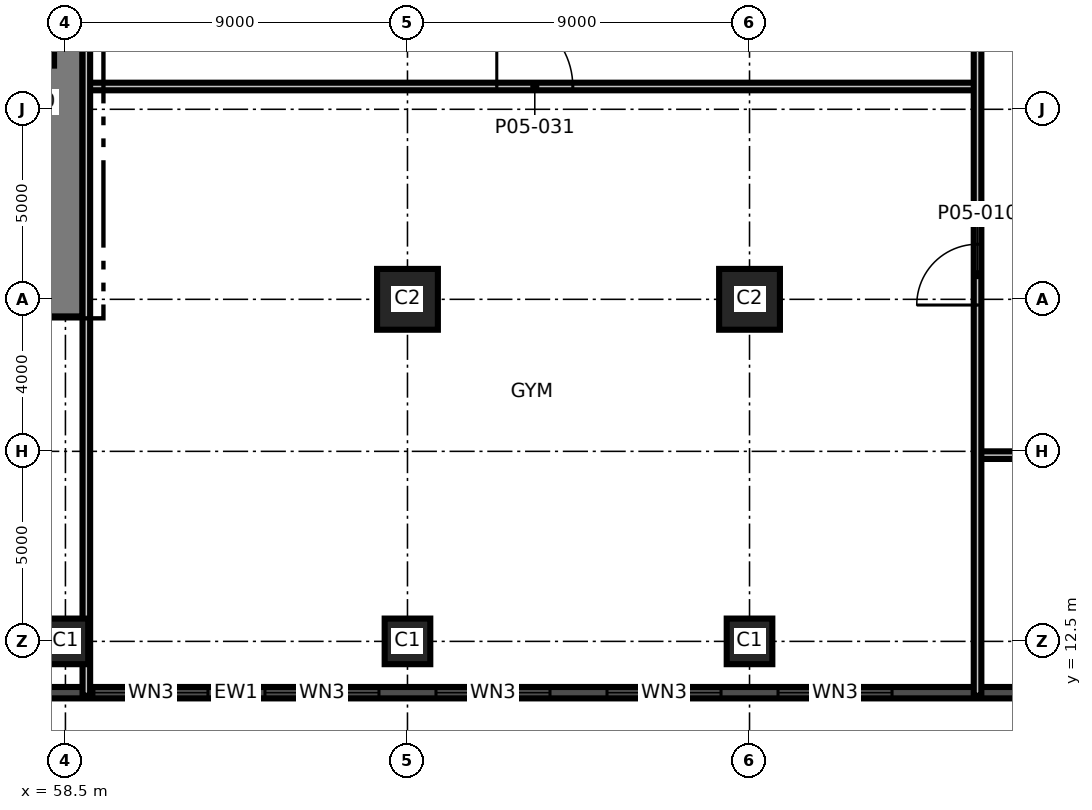
"""IFC4 building model, lengths in metres.
Left out: names, types, materials, properties, quantities, classifications, styles, units other than length and angle.
Written with IfcOpenShell. Run it as: python <this file> out.ifc"""

import sys

from ifc_helpers import new_model, si_unit, direction, frame, frame_2d, origin, origin_2d, place, context, subcontext, project, spatial, rectangle, extrude, element, fill, save


model = new_model("IFC4")
c1 = context("Model", 3, precision=1e-05, world=origin(), true_north=direction((0.0, 1.0)))
c2 = subcontext(c1, "Body", "Model", "MODEL_VIEW")
j1 = project(units=[si_unit("LENGTHUNIT", "METRE"), si_unit("PLANEANGLEUNIT", "RADIAN")], contexts=[c1])
p1 = place(None, origin())
s1 = spatial("IfcSite", under=j1, at=p1, CompositionType="ELEMENT")
p2 = place(p1, origin())
s2 = spatial("IfcBuilding", under=s1, at=p2, CompositionType="ELEMENT")
p3 = place(p2, frame((0.0, 0.0, 28.5)))
s3 = spatial("IfcBuildingStorey", under=s2, at=p3, CompositionType="ELEMENT", Elevation=28.5)
p4 = place(p3, frame((58.5, 21.05, 0.0), z_axis=(0.0, 0.0, 1.0), x_axis=(0.0, 1.0, 0.0)))
e1 = element("IfcWall", 1, at=p4, inside=s3, PredefinedType="SHEAR", context=c2, shape_type="SweptSolid", body=[
    extrude(rectangle(XDim=18.9, YDim=0.9, at=frame_2d((9.45, 0.0))), origin(), (0.0, 0.0, 1.0), 5.0),
])
for number, where, z_axis, x_axis in (
    (2, (58.5, 12.5, 0.0), (0.0, 0.0, 1.0), (1.0, 0.0, 0.0)),
    (3, (67.5, 12.5, 0.0), (0.0, 0.0, 1.0), (1.0, 0.0, 0.0)),
    (4, (76.5, 12.5, 0.0), (0.0, 0.0, 1.0), (1.0, 0.0, 0.0)),
):
    element("IfcColumn", number, at=place(p3, frame(where, z_axis=z_axis, x_axis=x_axis)), inside=s3, PredefinedType="COLUMN", context=c2, shape_type="SweptSolid", body=[
        extrude(rectangle(XDim=1.2, YDim=1.2, at=origin_2d()), origin(), (0.0, 0.0, 1.0), 5.0),
    ])
for number, where, z_axis, x_axis in (
    (5, (67.5, 21.5, 0.0), (0.0, 0.0, 1.0), (1.0, 0.0, 0.0)),
    (6, (76.5, 21.5, 0.0), (0.0, 0.0, 1.0), (1.0, 0.0, 0.0)),
):
    element("IfcColumn", number, at=place(p3, frame(where, z_axis=z_axis, x_axis=x_axis)), inside=s3, PredefinedType="COLUMN", context=c2, shape_type="SweptSolid", body=[
        extrude(rectangle(XDim=1.6, YDim=1.6, at=origin_2d()), origin(), (0.0, 0.0, 1.0), 5.0),
    ])
p5 = place(p3, frame((27.048, 11.15, 0.0), z_axis=(0.0, 0.0, 1.0), x_axis=(1.0, 0.0, 0.0)))
e7 = element("IfcWall", 7, at=p5, inside=s3, PredefinedType="SOLIDWALL", context=c2, shape_type="SweptSolid", body=[
    extrude(rectangle(XDim=71.88, YDim=0.3, at=frame_2d((35.94, 0.0))), origin(), (0.0, 0.0, 1.0), 4.7),
])
p6 = place(p5, frame((0.726, 0.0, 0.9)))
e8 = element("IfcOpeningElement", 8, at=p6, cuts=e7, PredefinedType="OPENING", context=c2, shape_type="SweptSolid", body=[
    extrude(rectangle(XDim=3.0, YDim=2.4, at=frame_2d((1.5, 1.2))), frame((0.0, 0.16, 0.0), z_axis=(0.0, -1.0, 0.0), x_axis=(1.0, 0.0, 0.0)), (0.0, 0.0, 1.0), 0.32),
])
p7 = place(p5, frame((5.202, 0.0, 0.9)))
e9 = element("IfcOpeningElement", 9, at=p7, cuts=e7, PredefinedType="OPENING", context=c2, shape_type="SweptSolid", body=[
    extrude(rectangle(XDim=3.0, YDim=2.4, at=frame_2d((1.5, 1.2))), frame((0.0, 0.16, 0.0), z_axis=(0.0, -1.0, 0.0), x_axis=(1.0, 0.0, 0.0)), (0.0, 0.0, 1.0), 0.32),
])
p8 = place(p5, frame((9.702, 0.0, 0.9)))
e10 = element("IfcOpeningElement", 10, at=p8, cuts=e7, PredefinedType="OPENING", context=c2, shape_type="SweptSolid", body=[
    extrude(rectangle(XDim=3.0, YDim=2.4, at=frame_2d((1.5, 1.2))), frame((0.0, 0.16, 0.0), z_axis=(0.0, -1.0, 0.0), x_axis=(1.0, 0.0, 0.0)), (0.0, 0.0, 1.0), 0.32),
])
p9 = place(p5, frame((14.202, 0.0, 0.9)))
e11 = element("IfcOpeningElement", 11, at=p9, cuts=e7, PredefinedType="OPENING", context=c2, shape_type="SweptSolid", body=[
    extrude(rectangle(XDim=3.0, YDim=2.4, at=frame_2d((1.5, 1.2))), frame((0.0, 0.16, 0.0), z_axis=(0.0, -1.0, 0.0), x_axis=(1.0, 0.0, 0.0)), (0.0, 0.0, 1.0), 0.32),
])
p10 = place(p5, frame((18.702, 0.0, 0.9)))
e12 = element("IfcOpeningElement", 12, at=p10, cuts=e7, PredefinedType="OPENING", context=c2, shape_type="SweptSolid", body=[
    extrude(rectangle(XDim=3.0, YDim=2.4, at=frame_2d((1.5, 1.2))), frame((0.0, 0.16, 0.0), z_axis=(0.0, -1.0, 0.0), x_axis=(1.0, 0.0, 0.0)), (0.0, 0.0, 1.0), 0.32),
])
p11 = place(p5, frame((23.202, 0.0, 0.9)))
e13 = element("IfcOpeningElement", 13, at=p11, cuts=e7, PredefinedType="OPENING", context=c2, shape_type="SweptSolid", body=[
    extrude(rectangle(XDim=3.0, YDim=2.4, at=frame_2d((1.5, 1.2))), frame((0.0, 0.16, 0.0), z_axis=(0.0, -1.0, 0.0), x_axis=(1.0, 0.0, 0.0)), (0.0, 0.0, 1.0), 0.32),
])
p12 = place(p5, frame((27.702, 0.0, 0.9)))
e14 = element("IfcOpeningElement", 14, at=p12, cuts=e7, PredefinedType="OPENING", context=c2, shape_type="SweptSolid", body=[
    extrude(rectangle(XDim=3.0, YDim=2.4, at=frame_2d((1.5, 1.2))), frame((0.0, 0.16, 0.0), z_axis=(0.0, -1.0, 0.0), x_axis=(1.0, 0.0, 0.0)), (0.0, 0.0, 1.0), 0.32),
])
p13 = place(p5, frame((32.202, 0.0, 0.9)))
e15 = element("IfcOpeningElement", 15, at=p13, cuts=e7, PredefinedType="OPENING", context=c2, shape_type="SweptSolid", body=[
    extrude(rectangle(XDim=3.0, YDim=2.4, at=frame_2d((1.5, 1.2))), frame((0.0, 0.16, 0.0), z_axis=(0.0, -1.0, 0.0), x_axis=(1.0, 0.0, 0.0)), (0.0, 0.0, 1.0), 0.32),
])
p14 = place(p5, frame((36.702, 0.0, 0.9)))
e16 = element("IfcOpeningElement", 16, at=p14, cuts=e7, PredefinedType="OPENING", context=c2, shape_type="SweptSolid", body=[
    extrude(rectangle(XDim=3.0, YDim=2.4, at=frame_2d((1.5, 1.2))), frame((0.0, 0.16, 0.0), z_axis=(0.0, -1.0, 0.0), x_axis=(1.0, 0.0, 0.0)), (0.0, 0.0, 1.0), 0.32),
])
p15 = place(p5, frame((41.202, 0.0, 0.9)))
e17 = element("IfcOpeningElement", 17, at=p15, cuts=e7, PredefinedType="OPENING", context=c2, shape_type="SweptSolid", body=[
    extrude(rectangle(XDim=3.0, YDim=2.4, at=frame_2d((1.5, 1.2))), frame((0.0, 0.16, 0.0), z_axis=(0.0, -1.0, 0.0), x_axis=(1.0, 0.0, 0.0)), (0.0, 0.0, 1.0), 0.32),
])
p16 = place(p5, frame((45.702, 0.0, 0.9)))
e18 = element("IfcOpeningElement", 18, at=p16, cuts=e7, PredefinedType="OPENING", context=c2, shape_type="SweptSolid", body=[
    extrude(rectangle(XDim=3.0, YDim=2.4, at=frame_2d((1.5, 1.2))), frame((0.0, 0.16, 0.0), z_axis=(0.0, -1.0, 0.0), x_axis=(1.0, 0.0, 0.0)), (0.0, 0.0, 1.0), 0.32),
])
p17 = place(p5, frame((50.202, 0.0, 0.9)))
e19 = element("IfcOpeningElement", 19, at=p17, cuts=e7, PredefinedType="OPENING", context=c2, shape_type="SweptSolid", body=[
    extrude(rectangle(XDim=3.0, YDim=2.4, at=frame_2d((1.5, 1.2))), frame((0.0, 0.16, 0.0), z_axis=(0.0, -1.0, 0.0), x_axis=(1.0, 0.0, 0.0)), (0.0, 0.0, 1.0), 0.32),
])
p18 = place(p5, frame((59.202, 0.0, 0.9)))
e20 = element("IfcOpeningElement", 20, at=p18, cuts=e7, PredefinedType="OPENING", context=c2, shape_type="SweptSolid", body=[
    extrude(rectangle(XDim=3.0, YDim=2.4, at=frame_2d((1.5, 1.2))), frame((0.0, 0.16, 0.0), z_axis=(0.0, -1.0, 0.0), x_axis=(1.0, 0.0, 0.0)), (0.0, 0.0, 1.0), 0.32),
])
p19 = place(p5, frame((63.702, 0.0, 0.9)))
e21 = element("IfcOpeningElement", 21, at=p19, cuts=e7, PredefinedType="OPENING", context=c2, shape_type="SweptSolid", body=[
    extrude(rectangle(XDim=3.0, YDim=2.4, at=frame_2d((1.5, 1.2))), frame((0.0, 0.16, 0.0), z_axis=(0.0, -1.0, 0.0), x_axis=(1.0, 0.0, 0.0)), (0.0, 0.0, 1.0), 0.32),
])
p20 = place(p5, frame((68.226, 0.0, 0.9)))
e22 = element("IfcOpeningElement", 22, at=p20, cuts=e7, PredefinedType="OPENING", context=c2, shape_type="SweptSolid", body=[
    extrude(rectangle(XDim=3.0, YDim=2.4, at=frame_2d((1.5, 1.2))), frame((0.0, 0.16, 0.0), z_axis=(0.0, -1.0, 0.0), x_axis=(1.0, 0.0, 0.0)), (0.0, 0.0, 1.0), 0.32),
])
p21 = place(p3, frame((55.8, 27.8, 0.0), z_axis=(0.0, 0.0, 1.0), x_axis=(1.0, 0.0, 0.0)))
e23 = element("IfcWall", 23, at=p21, inside=s3, PredefinedType="PARTITIONING", context=c2, shape_type="SweptSolid", body=[
    extrude(rectangle(XDim=2.4, YDim=0.3, at=frame_2d((1.2, 0.0))), origin(), (0.0, 0.0, 1.0), 4.7),
])
p22 = place(p21, frame((0.75, 0.0, 0.0)))
e24 = element("IfcOpeningElement", 24, at=p22, cuts=e23, PredefinedType="OPENING", context=c2, shape_type="SweptSolid", body=[
    extrude(rectangle(XDim=0.9, YDim=2.1, at=frame_2d((0.45, 1.05))), frame((0.0, 0.16, 0.0), z_axis=(0.0, -1.0, 0.0), x_axis=(1.0, 0.0, 0.0)), (0.0, 0.0, 1.0), 0.32),
])
p23 = place(p3, frame((82.5, 17.4, 0.0), z_axis=(0.0, 0.0, 1.0), x_axis=(1.0, 0.0, 0.0)))
e25 = element("IfcWall", 25, at=p23, inside=s3, PredefinedType="PARTITIONING", context=c2, shape_type="SweptSolid", body=[
    extrude(rectangle(XDim=2.1, YDim=0.2, at=frame_2d((1.05, 0.0))), origin(), (0.0, 0.0, 1.0), 4.7),
])
p24 = place(p3, frame((59.05, 27.1, 0.0), z_axis=(0.0, 0.0, 1.0), x_axis=(1.0, 0.0, 0.0)))
e26 = element("IfcWall", 26, at=p24, inside=s3, PredefinedType="PARTITIONING", context=c2, shape_type="SweptSolid", body=[
    extrude(rectangle(XDim=23.45, YDim=0.2, at=frame_2d((11.725, 0.0))), origin(), (0.0, 0.0, 1.0), 4.7),
])
p25 = place(p24, frame((10.8, 0.0, 0.0)))
e27 = element("IfcOpeningElement", 27, at=p25, cuts=e26, PredefinedType="OPENING", context=c2, shape_type="SweptSolid", body=[
    extrude(rectangle(XDim=2.0, YDim=2.1, at=frame_2d((1.0, 1.05))), frame((0.0, 0.11, 0.0), z_axis=(0.0, -1.0, 0.0), x_axis=(1.0, 0.0, 0.0)), (0.0, 0.0, 1.0), 0.22),
])
p26 = place(p3, frame((59.05, 11.07, 0.0), z_axis=(0.0, 0.0, 1.0), x_axis=(0.0, 1.0, 0.0)))
e28 = element("IfcWall", 28, at=p26, inside=s3, PredefinedType="PARTITIONING", context=c2, shape_type="SweptSolid", body=[
    extrude(rectangle(XDim=19.83, YDim=0.2, at=frame_2d((9.915, 0.0))), origin(), (0.0, 0.0, 1.0), 4.7),
])
p27 = place(p3, frame((82.5, 11.07, 0.0), z_axis=(0.0, 0.0, 1.0), x_axis=(0.0, 1.0, 0.0)))
e29 = element("IfcWall", 29, at=p27, inside=s3, PredefinedType="PARTITIONING", context=c2, shape_type="SweptSolid", body=[
    extrude(rectangle(XDim=19.83, YDim=0.2, at=frame_2d((9.915, 0.0))), origin(), (0.0, 0.0, 1.0), 4.7),
])
p28 = place(p27, frame((10.28, 0.0, 0.0)))
e30 = element("IfcOpeningElement", 30, at=p28, cuts=e29, PredefinedType="OPENING", context=c2, shape_type="SweptSolid", body=[
    extrude(rectangle(XDim=1.6, YDim=2.1, at=frame_2d((0.8, 1.05))), frame((0.0, 0.11, 0.0), z_axis=(0.0, -1.0, 0.0), x_axis=(1.0, 0.0, 0.0)), (0.0, 0.0, 1.0), 0.22),
])
p29 = place(p13, origin())
e31 = element("IfcWindow", 31, at=p29, inside=s3, PartitioningType="SINGLE_PANEL", PredefinedType="WINDOW", context=c2, shape_type="SweptSolid", body=[
    extrude(rectangle(XDim=3.0, YDim=2.4, at=frame_2d((1.5, 1.2))), frame((0.0, 0.03, 0.0), z_axis=(0.0, -1.0, 0.0), x_axis=(1.0, 0.0, 0.0)), (0.0, 0.0, 1.0), 0.06),
])
fill(e15, e31)
p30 = place(p14, origin())
e32 = element("IfcWindow", 32, at=p30, inside=s3, PartitioningType="SINGLE_PANEL", PredefinedType="WINDOW", context=c2, shape_type="SweptSolid", body=[
    extrude(rectangle(XDim=3.0, YDim=2.4, at=frame_2d((1.5, 1.2))), frame((0.0, 0.03, 0.0), z_axis=(0.0, -1.0, 0.0), x_axis=(1.0, 0.0, 0.0)), (0.0, 0.0, 1.0), 0.06),
])
fill(e16, e32)
p31 = place(p15, origin())
e33 = element("IfcWindow", 33, at=p31, inside=s3, PartitioningType="SINGLE_PANEL", PredefinedType="WINDOW", context=c2, shape_type="SweptSolid", body=[
    extrude(rectangle(XDim=3.0, YDim=2.4, at=frame_2d((1.5, 1.2))), frame((0.0, 0.03, 0.0), z_axis=(0.0, -1.0, 0.0), x_axis=(1.0, 0.0, 0.0)), (0.0, 0.0, 1.0), 0.06),
])
fill(e17, e33)
p32 = place(p16, origin())
e34 = element("IfcWindow", 34, at=p32, inside=s3, PartitioningType="SINGLE_PANEL", PredefinedType="WINDOW", context=c2, shape_type="SweptSolid", body=[
    extrude(rectangle(XDim=3.0, YDim=2.4, at=frame_2d((1.5, 1.2))), frame((0.0, 0.03, 0.0), z_axis=(0.0, -1.0, 0.0), x_axis=(1.0, 0.0, 0.0)), (0.0, 0.0, 1.0), 0.06),
])
fill(e18, e34)
p33 = place(p17, origin())
e35 = element("IfcWindow", 35, at=p33, inside=s3, PartitioningType="SINGLE_PANEL", PredefinedType="WINDOW", context=c2, shape_type="SweptSolid", body=[
    extrude(rectangle(XDim=3.0, YDim=2.4, at=frame_2d((1.5, 1.2))), frame((0.0, 0.03, 0.0), z_axis=(0.0, -1.0, 0.0), x_axis=(1.0, 0.0, 0.0)), (0.0, 0.0, 1.0), 0.06),
])
fill(e19, e35)
p34 = place(p28, origin())
e36 = element("IfcDoor", 36, at=p34, inside=s3, OperationType="SINGLE_SWING_RIGHT", PredefinedType="DOOR", context=c2, shape_type="SweptSolid", body=[
    extrude(rectangle(XDim=1.6, YDim=2.1, at=frame_2d((0.8, 1.05))), frame((0.0, 0.025, 0.0), z_axis=(0.0, -1.0, 0.0), x_axis=(1.0, 0.0, 0.0)), (0.0, 0.0, 1.0), 0.05),
])
fill(e30, e36)
p35 = place(p25, origin())
e37 = element("IfcDoor", 37, at=p35, inside=s3, OperationType="SINGLE_SWING_LEFT", PredefinedType="DOOR", context=c2, shape_type="SweptSolid", body=[
    extrude(rectangle(XDim=2.0, YDim=2.1, at=frame_2d((1.0, 1.05))), frame((0.0, 0.025, 0.0), z_axis=(0.0, -1.0, 0.0), x_axis=(1.0, 0.0, 0.0)), (0.0, 0.0, 1.0), 0.05),
])
fill(e27, e37)
save(model, sys.argv[1])
